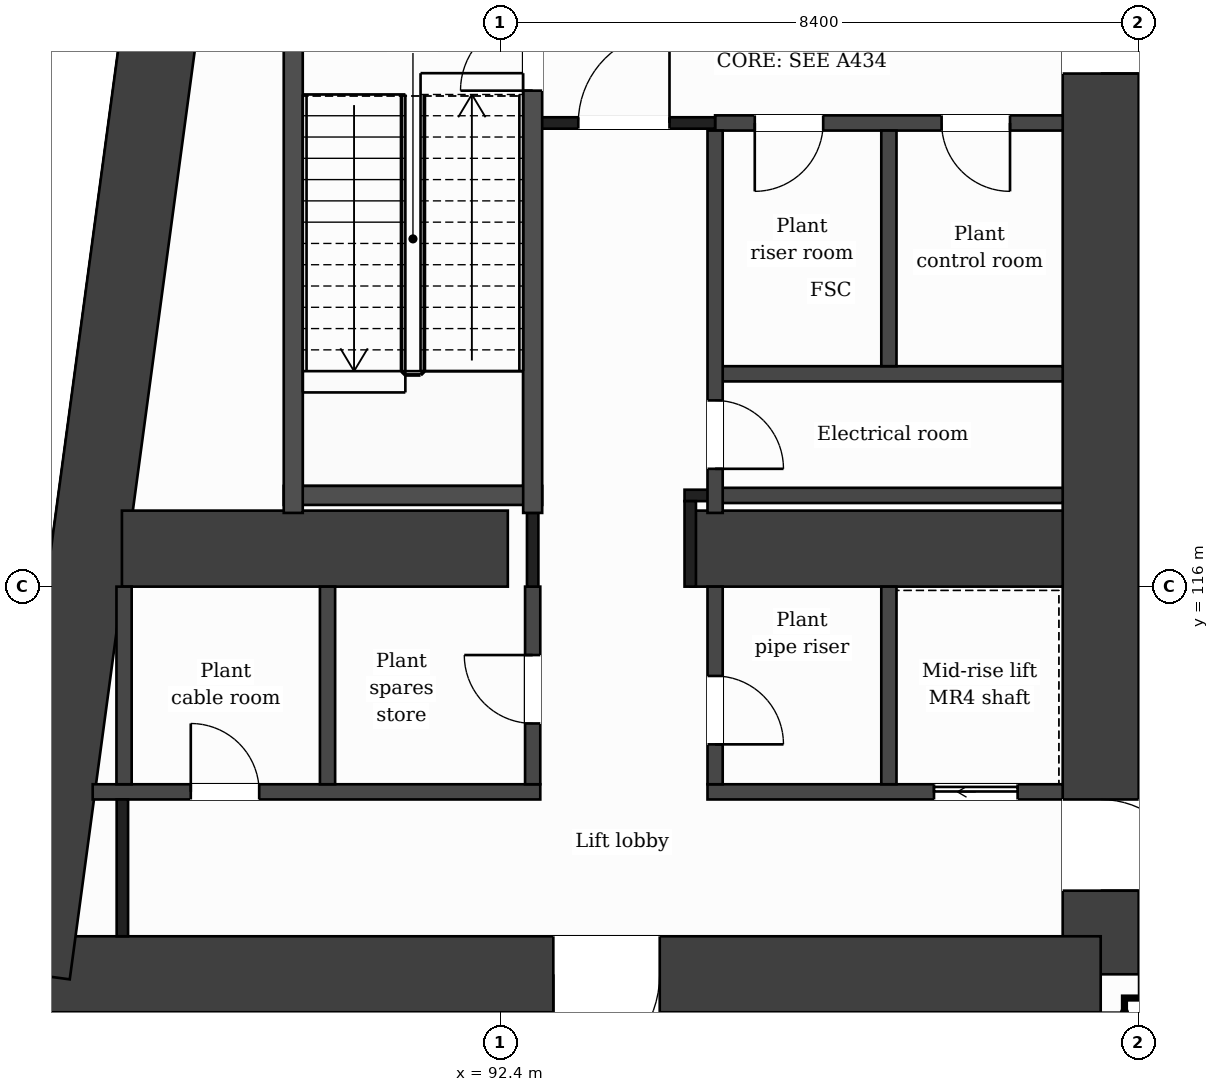
"""IFC4 building model, lengths in metres.
Left out: names, types, materials, properties, quantities, classifications, styles, units other than length and angle.
Written with IfcOpenShell. Run it as: python <this file> out.ifc"""

import sys

from ifc_helpers import new_model, si_unit, direction, frame, frame_2d, origin, place, context, subcontext, project, spatial, rectangle, extrude, element, fill, save


model = new_model("IFC4")
c1 = context("Model", 3, precision=1e-05, world=origin(), true_north=direction((0.0, 1.0)))
c2 = subcontext(c1, "Body", "Model", "MODEL_VIEW")
j1 = project(units=[si_unit("LENGTHUNIT", "METRE"), si_unit("PLANEANGLEUNIT", "RADIAN")], contexts=[c1])
p1 = place(None, origin())
s1 = spatial("IfcSite", under=j1, at=p1, CompositionType="ELEMENT")
p2 = place(p1, origin())
s2 = spatial("IfcBuilding", under=s1, at=p2, CompositionType="ELEMENT")
p3 = place(p2, frame((0.0, 0.0, 142.8)))
s3 = spatial("IfcBuildingStorey", under=s2, at=p3, CompositionType="ELEMENT", Elevation=142.8)
p4 = place(p3, frame((100.3, 131.9, 0.0), z_axis=(0.0, 0.0, 1.0), x_axis=(0.0, -1.0, 0.0)))
e1 = element("IfcWall", 1, at=p4, inside=s3, PredefinedType="SHEAR", context=c2, shape_type="SweptSolid", body=[
    extrude(rectangle(XDim=21.0, YDim=1.0, at=frame_2d((10.5, 0.0))), origin(), (0.0, 0.0, 1.0), 5.0),
])
p5 = place(p4, frame((18.7, 0.0, 0.0)))
e2 = element("IfcOpeningElement", 2, at=p5, cuts=e1, PredefinedType="OPENING", context=c2, shape_type="SweptSolid", body=[
    extrude(rectangle(XDim=1.2, YDim=2.1, at=frame_2d((0.6, 1.05))), frame((0.0, 0.51, 0.0), z_axis=(0.0, -1.0, 0.0), x_axis=(1.0, 0.0, 0.0)), (0.0, 0.0, 1.0), 1.02),
])
p6 = place(p4, frame((7.75, 0.0, 0.0)))
e3 = element("IfcOpeningElement", 3, at=p6, cuts=e1, PredefinedType="OPENING", context=c2, shape_type="SweptSolid", body=[
    extrude(rectangle(XDim=1.4, YDim=2.1, at=frame_2d((0.7, 1.05))), frame((0.0, 0.51, 0.0), z_axis=(0.0, -1.0, 0.0), x_axis=(1.0, 0.0, 0.0)), (0.0, 0.0, 1.0), 1.02),
])
p7 = place(p3, frame((100.3, 110.9, 0.0), z_axis=(0.0, 0.0, 1.0), x_axis=(-1.0, 0.0, 0.0)))
e4 = element("IfcWall", 4, at=p7, inside=s3, PredefinedType="SHEAR", context=c2, shape_type="SweptSolid", body=[
    extrude(rectangle(XDim=14.059, YDim=1.0, at=frame_2d((7.03, 0.0))), origin(), (0.0, 0.0, 1.0), 5.0),
])
p8 = place(p7, frame((5.802, 0.0, 0.0)))
e5 = element("IfcOpeningElement", 5, at=p8, cuts=e4, PredefinedType="OPENING", context=c2, shape_type="SweptSolid", body=[
    extrude(rectangle(XDim=1.4, YDim=2.1, at=frame_2d((0.7, 1.05))), frame((0.0, 0.51, 0.0), z_axis=(0.0, -1.0, 0.0), x_axis=(1.0, 0.0, 0.0)), (0.0, 0.0, 1.0), 1.02),
])
p9 = place(p3, frame((86.241, 110.9, 0.0), z_axis=(0.0, 0.0, 1.0), x_axis=(0.133411141623, 0.991060778808, 0.0)))
e6 = element("IfcWall", 6, at=p9, inside=s3, PredefinedType="SHEAR", context=c2, shape_type="SweptSolid", body=[
    extrude(rectangle(XDim=21.189, YDim=1.0, at=frame_2d((10.595, 0.0))), origin(), (0.0, 0.0, 1.0), 5.0),
])
p10 = place(p3, frame((87.423, 116.5, 0.0), z_axis=(0.0, 0.0, 1.0), x_axis=(1.0, 0.0, 0.0)))
e7 = element("IfcWall", 7, at=p10, inside=s3, PredefinedType="SHEAR", context=c2, shape_type="SweptSolid", body=[
    extrude(rectangle(XDim=5.077, YDim=1.0, at=frame_2d((2.539, 0.0))), origin(), (0.0, 0.0, 1.0), 5.0),
])
p11 = place(p3, frame((94.9, 116.5, 0.0), z_axis=(0.0, 0.0, 1.0), x_axis=(1.0, 0.0, 0.0)))
e8 = element("IfcWall", 8, at=p11, inside=s3, PredefinedType="SHEAR", context=c2, shape_type="SweptSolid", body=[
    extrude(rectangle(XDim=4.9, YDim=1.0, at=frame_2d((2.45, 0.0))), origin(), (0.0, 0.0, 1.0), 5.0),
])
p12 = place(p3, frame((87.334, 110.4, 0.0), z_axis=(0.0, 0.0, 1.0), x_axis=(-0.133437175554, -0.991057273915, 0.0)))
e9 = element("IfcWall", 9, at=p12, inside=s3, PredefinedType="SOLIDWALL", context=c2, shape_type="SweptSolid", body=[
    extrude(rectangle(XDim=6.781, YDim=0.3, at=frame_2d((3.39, 0.0))), origin(), (0.0, 0.0, 1.0), 4.68),
])
p13 = place(p12, frame((1.418, 0.0, 0.0)))
e10 = element("IfcOpeningElement", 10, at=p13, cuts=e9, PredefinedType="OPENING", context=c2, shape_type="SweptSolid", body=[
    extrude(rectangle(XDim=1.2, YDim=2.4, at=frame_2d((0.6, 1.2))), frame((0.0, 0.16, 0.0), z_axis=(0.0, -1.0, 0.0), x_axis=(1.0, 0.0, 0.0)), (0.0, 0.0, 1.0), 0.32),
])
p14 = place(p3, frame((100.7, 110.4, 0.0), z_axis=(0.0, 0.0, 1.0), x_axis=(1.0, 0.0, 0.0)))
e11 = element("IfcWall", 11, at=p14, inside=s3, PredefinedType="PARTITIONING", context=c2, shape_type="SweptSolid", body=[
    extrude(rectangle(XDim=25.4, YDim=0.2, at=frame_2d((12.7, 0.0))), origin(), (0.0, 0.0, 1.0), 4.68),
])
p15 = place(p14, frame((20.5, 0.0, 0.0)))
e12 = element("IfcOpeningElement", 12, at=p15, cuts=e11, PredefinedType="OPENING", context=c2, shape_type="SweptSolid", body=[
    extrude(rectangle(XDim=1.2, YDim=2.1, at=frame_2d((0.6, 1.05))), frame((0.0, 0.11, 0.0), z_axis=(0.0, -1.0, 0.0), x_axis=(1.0, 0.0, 0.0)), (0.0, 0.0, 1.0), 0.22),
])
p16 = place(p3, frame((87.039, 113.3, 0.0), z_axis=(0.0, 0.0, 1.0), x_axis=(1.0, 0.0, 0.0)))
e13 = element("IfcWall", 13, at=p16, inside=s3, PredefinedType="PARTITIONING", context=c2, shape_type="SweptSolid", body=[
    extrude(rectangle(XDim=5.888, YDim=0.2, at=frame_2d((2.944, 0.0))), origin(), (0.0, 0.0, 1.0), 4.68),
])
p17 = place(p16, frame((1.29, 0.0, 0.0)))
e14 = element("IfcOpeningElement", 14, at=p17, cuts=e13, PredefinedType="OPENING", context=c2, shape_type="SweptSolid", body=[
    extrude(rectangle(XDim=0.9, YDim=2.1, at=frame_2d((0.45, 1.05))), frame((0.0, 0.11, 0.0), z_axis=(0.0, -1.0, 0.0), x_axis=(1.0, 0.0, 0.0)), (0.0, 0.0, 1.0), 0.22),
])
p18 = place(p3, frame((95.127, 113.3, 0.0), z_axis=(0.0, 0.0, 1.0), x_axis=(1.0, 0.0, 0.0)))
e15 = element("IfcWall", 15, at=p18, inside=s3, PredefinedType="PARTITIONING", context=c2, shape_type="SweptSolid", body=[
    extrude(rectangle(XDim=4.673, YDim=0.2, at=frame_2d((2.336, 0.0))), origin(), (0.0, 0.0, 1.0), 4.68),
])
p19 = place(p18, frame((2.98, 0.0, 0.0)))
e16 = element("IfcOpeningElement", 16, at=p19, cuts=e15, PredefinedType="OPENING", context=c2, shape_type="SweptSolid", body=[
    extrude(rectangle(XDim=1.1, YDim=2.1, at=frame_2d((0.55, 1.05))), frame((0.0, 0.11, 0.0), z_axis=(0.0, -1.0, 0.0), x_axis=(1.0, 0.0, 0.0)), (0.0, 0.0, 1.0), 0.22),
])
p20 = place(p3, frame((95.227, 117.2, 0.0), z_axis=(0.0, 0.0, 1.0), x_axis=(1.0, 0.0, 0.0)))
e17 = element("IfcWall", 17, at=p20, inside=s3, PredefinedType="PARTITIONING", context=c2, shape_type="SweptSolid", body=[
    extrude(rectangle(XDim=4.573, YDim=0.2, at=frame_2d((2.287, 0.0))), origin(), (0.0, 0.0, 1.0), 4.68),
])
p21 = place(p3, frame((94.825, 117.2, 0.0), z_axis=(0.0, 0.0, 1.0), x_axis=(1.0, 0.0, 0.0)))
e18 = element("IfcWall", 18, at=p21, inside=s3, PredefinedType="PARTITIONING", context=c2, shape_type="SweptSolid", body=[
    extrude(rectangle(XDim=0.402, YDim=0.15, at=frame_2d((0.201, 0.0))), origin(), (0.0, 0.0, 1.0), 4.68),
])
p22 = place(p3, frame((89.552, 117.2, 0.0), z_axis=(0.0, 0.0, 1.0), x_axis=(1.0, 0.0, 0.0)))
e19 = element("IfcWall", 19, at=p22, inside=s3, PredefinedType="PARTITIONING", context=c2, shape_type="SweptSolid", body=[
    extrude(rectangle(XDim=3.4, YDim=0.25, at=frame_2d((1.7, 0.0))), origin(), (0.0, 0.0, 1.0), 4.68),
])
p23 = place(p3, frame((95.227, 118.8, 0.0), z_axis=(0.0, 0.0, 1.0), x_axis=(1.0, 0.0, 0.0)))
e20 = element("IfcWall", 20, at=p23, inside=s3, PredefinedType="PARTITIONING", context=c2, shape_type="SweptSolid", body=[
    extrude(rectangle(XDim=4.573, YDim=0.2, at=frame_2d((2.287, 0.0))), origin(), (0.0, 0.0, 1.0), 4.68),
])
p24 = place(p3, frame((95.227, 122.1, 0.0), z_axis=(0.0, 0.0, 1.0), x_axis=(1.0, 0.0, 0.0)))
e21 = element("IfcWall", 21, at=p24, inside=s3, PredefinedType="PARTITIONING", context=c2, shape_type="SweptSolid", body=[
    extrude(rectangle(XDim=4.573, YDim=0.2, at=frame_2d((2.287, 0.0))), origin(), (0.0, 0.0, 1.0), 4.68),
])
p25 = place(p24, frame((0.522, 0.0, 0.0)))
e22 = element("IfcOpeningElement", 22, at=p25, cuts=e21, PredefinedType="OPENING", context=c2, shape_type="SweptSolid", body=[
    extrude(rectangle(XDim=0.9, YDim=2.1, at=frame_2d((0.45, 1.05))), frame((0.0, 0.11, 0.0), z_axis=(0.0, -1.0, 0.0), x_axis=(1.0, 0.0, 0.0)), (0.0, 0.0, 1.0), 0.22),
])
p26 = place(p24, frame((2.98, 0.0, 0.0)))
e23 = element("IfcOpeningElement", 23, at=p26, cuts=e21, PredefinedType="OPENING", context=c2, shape_type="SweptSolid", body=[
    extrude(rectangle(XDim=0.9, YDim=2.1, at=frame_2d((0.45, 1.05))), frame((0.0, 0.11, 0.0), z_axis=(0.0, -1.0, 0.0), x_axis=(1.0, 0.0, 0.0)), (0.0, 0.0, 1.0), 0.22),
])
p27 = place(p3, frame((92.827, 122.1, 0.0), z_axis=(0.0, 0.0, 1.0), x_axis=(1.0, 0.0, 0.0)))
e24 = element("IfcWall", 24, at=p27, inside=s3, PredefinedType="PARTITIONING", context=c2, shape_type="SweptSolid", body=[
    extrude(rectangle(XDim=2.4, YDim=0.15, at=frame_2d((1.2, 0.0))), origin(), (0.0, 0.0, 1.0), 4.68),
])
p28 = place(p27, frame((0.6, 0.0, 0.0)))
e25 = element("IfcOpeningElement", 25, at=p28, cuts=e24, PredefinedType="OPENING", context=c2, shape_type="SweptSolid", body=[
    extrude(rectangle(XDim=1.2, YDim=2.1, at=frame_2d((0.6, 1.05))), frame((0.0, 0.085, 0.0), z_axis=(0.0, -1.0, 0.0), x_axis=(1.0, 0.0, 0.0)), (0.0, 0.0, 1.0), 0.17),
])
p29 = place(p3, frame((87.451, 113.4, 0.0), z_axis=(0.0, 0.0, 1.0), x_axis=(0.0, 1.0, 0.0)))
e26 = element("IfcWall", 26, at=p29, inside=s3, PredefinedType="PARTITIONING", context=c2, shape_type="SweptSolid", body=[
    extrude(rectangle(XDim=2.6, YDim=0.2, at=frame_2d((1.3, 0.0))), origin(), (0.0, 0.0, 1.0), 4.68),
])
p30 = place(p3, frame((87.429, 111.4, 0.0), z_axis=(0.0, 0.0, 1.0), x_axis=(0.0, 1.0, 0.0)))
e27 = element("IfcWall", 27, at=p30, inside=s3, PredefinedType="PARTITIONING", context=c2, shape_type="SweptSolid", body=[
    extrude(rectangle(XDim=1.8, YDim=0.15, at=frame_2d((0.9, 0.0))), origin(), (0.0, 0.0, 1.0), 4.68),
])
p31 = place(p3, frame((89.677, 116.97, 0.0), z_axis=(0.0, 0.0, 1.0), x_axis=(0.0, 1.0, 0.0)))
e28 = element("IfcWall", 28, at=p31, inside=s3, PredefinedType="PARTITIONING", context=c2, shape_type="SweptSolid", body=[
    extrude(rectangle(XDim=6.855, YDim=0.25, at=frame_2d((3.427, 0.0))), origin(), (0.0, 0.0, 1.0), 4.68),
])
p32 = place(p3, frame((90.128, 113.4, 0.0), z_axis=(0.0, 0.0, 1.0), x_axis=(0.0, 1.0, 0.0)))
e29 = element("IfcWall", 29, at=p32, inside=s3, PredefinedType="PARTITIONING", context=c2, shape_type="SweptSolid", body=[
    extrude(rectangle(XDim=2.6, YDim=0.2, at=frame_2d((1.3, 0.0))), origin(), (0.0, 0.0, 1.0), 4.68),
])
p33 = place(p3, frame((92.827, 113.4, 0.0), z_axis=(0.0, 0.0, 1.0), x_axis=(0.0, 1.0, 0.0)))
e30 = element("IfcWall", 30, at=p33, inside=s3, PredefinedType="PARTITIONING", context=c2, shape_type="SweptSolid", body=[
    extrude(rectangle(XDim=2.6, YDim=0.2, at=frame_2d((1.3, 0.0))), origin(), (0.0, 0.0, 1.0), 4.68),
])
p34 = place(p33, frame((0.8, 0.0, 0.0)))
e31 = element("IfcOpeningElement", 31, at=p34, cuts=e30, PredefinedType="OPENING", context=c2, shape_type="SweptSolid", body=[
    extrude(rectangle(XDim=0.9, YDim=2.1, at=frame_2d((0.45, 1.05))), frame((0.0, 0.11, 0.0), z_axis=(0.0, -1.0, 0.0), x_axis=(1.0, 0.0, 0.0)), (0.0, 0.0, 1.0), 0.22),
])
p35 = place(p3, frame((92.827, 116.0, 0.0), z_axis=(0.0, 0.0, 1.0), x_axis=(0.0, 1.0, 0.0)))
e32 = element("IfcWall", 32, at=p35, inside=s3, PredefinedType="PARTITIONING", context=c2, shape_type="SweptSolid", body=[
    extrude(rectangle(XDim=0.97, YDim=0.15, at=frame_2d((0.485, 0.0))), origin(), (0.0, 0.0, 1.0), 4.68),
])
p36 = place(p3, frame((92.827, 116.97, 0.0), z_axis=(0.0, 0.0, 1.0), x_axis=(0.0, 1.0, 0.0)))
e33 = element("IfcWall", 33, at=p36, inside=s3, PredefinedType="PARTITIONING", context=c2, shape_type="SweptSolid", body=[
    extrude(rectangle(XDim=6.855, YDim=0.25, at=frame_2d((3.427, 0.0))), origin(), (0.0, 0.0, 1.0), 4.68),
])
p37 = place(p36, frame((5.555, 0.0, 0.0)))
e34 = element("IfcOpeningElement", 34, at=p37, cuts=e33, PredefinedType="OPENING", context=c2, shape_type="SweptSolid", body=[
    extrude(rectangle(XDim=0.95, YDim=2.1, at=frame_2d((0.475, 1.05))), frame((0.0, 0.135, 0.0), z_axis=(0.0, -1.0, 0.0), x_axis=(1.0, 0.0, 0.0)), (0.0, 0.0, 1.0), 0.27),
])
p38 = place(p3, frame((94.9, 116.0, 0.0), z_axis=(0.0, 0.0, 1.0), x_axis=(0.0, 1.0, 0.0)))
e35 = element("IfcWall", 35, at=p38, inside=s3, PredefinedType="PARTITIONING", context=c2, shape_type="SweptSolid", body=[
    extrude(rectangle(XDim=1.125, YDim=0.15, at=frame_2d((0.562, 0.0))), origin(), (0.0, 0.0, 1.0), 4.68),
])
p39 = place(p3, frame((95.227, 113.4, 0.0), z_axis=(0.0, 0.0, 1.0), x_axis=(0.0, 1.0, 0.0)))
e36 = element("IfcWall", 36, at=p39, inside=s3, PredefinedType="PARTITIONING", context=c2, shape_type="SweptSolid", body=[
    extrude(rectangle(XDim=2.6, YDim=0.2, at=frame_2d((1.3, 0.0))), origin(), (0.0, 0.0, 1.0), 4.68),
])
p40 = place(p39, frame((0.525, 0.0, 0.0)))
e37 = element("IfcOpeningElement", 37, at=p40, cuts=e36, PredefinedType="OPENING", context=c2, shape_type="SweptSolid", body=[
    extrude(rectangle(XDim=0.9, YDim=2.1, at=frame_2d((0.45, 1.05))), frame((0.0, 0.11, 0.0), z_axis=(0.0, -1.0, 0.0), x_axis=(1.0, 0.0, 0.0)), (0.0, 0.0, 1.0), 0.22),
])
p41 = place(p3, frame((95.227, 116.97, 0.0), z_axis=(0.0, 0.0, 1.0), x_axis=(0.0, 1.0, 0.0)))
e38 = element("IfcWall", 38, at=p41, inside=s3, PredefinedType="PARTITIONING", context=c2, shape_type="SweptSolid", body=[
    extrude(rectangle(XDim=5.03, YDim=0.2, at=frame_2d((2.515, 0.0))), origin(), (0.0, 0.0, 1.0), 4.68),
])
p42 = place(p41, frame((0.58, 0.0, 0.0)))
e39 = element("IfcOpeningElement", 39, at=p42, cuts=e38, PredefinedType="OPENING", context=c2, shape_type="SweptSolid", body=[
    extrude(rectangle(XDim=0.9, YDim=2.1, at=frame_2d((0.45, 1.05))), frame((0.0, 0.11, 0.0), z_axis=(0.0, -1.0, 0.0), x_axis=(1.0, 0.0, 0.0)), (0.0, 0.0, 1.0), 0.22),
])
p43 = place(p3, frame((97.513, 113.4, 0.0), z_axis=(0.0, 0.0, 1.0), x_axis=(0.0, 1.0, 0.0)))
e40 = element("IfcWall", 40, at=p43, inside=s3, PredefinedType="PARTITIONING", context=c2, shape_type="SweptSolid", body=[
    extrude(rectangle(XDim=2.6, YDim=0.2, at=frame_2d((1.3, 0.0))), origin(), (0.0, 0.0, 1.0), 4.68),
])
p44 = place(p3, frame((97.513, 118.9, 0.0), z_axis=(0.0, 0.0, 1.0), x_axis=(0.0, 1.0, 0.0)))
e41 = element("IfcWall", 41, at=p44, inside=s3, PredefinedType="PARTITIONING", context=c2, shape_type="SweptSolid", body=[
    extrude(rectangle(XDim=3.1, YDim=0.2, at=frame_2d((1.55, 0.0))), origin(), (0.0, 0.0, 1.0), 4.68),
])
p45 = place(p28, origin())
e42 = element("IfcDoor", 42, at=p45, inside=s3, OperationType="SINGLE_SWING_RIGHT", PredefinedType="DOOR", context=c2, shape_type="SweptSolid", body=[
    extrude(rectangle(XDim=1.2, YDim=2.1, at=frame_2d((0.6, 1.05))), frame((0.0, 0.025, 0.0), z_axis=(0.0, -1.0, 0.0), x_axis=(1.0, 0.0, 0.0)), (0.0, 0.0, 1.0), 0.05),
])
fill(e25, e42)
p46 = place(p25, origin())
e43 = element("IfcDoor", 43, at=p46, inside=s3, OperationType="SINGLE_SWING_LEFT", PredefinedType="DOOR", context=c2, shape_type="SweptSolid", body=[
    extrude(rectangle(XDim=0.9, YDim=2.1, at=frame_2d((0.45, 1.05))), frame((0.0, 0.025, 0.0), z_axis=(0.0, -1.0, 0.0), x_axis=(1.0, 0.0, 0.0)), (0.0, 0.0, 1.0), 0.05),
])
fill(e22, e43)
p47 = place(p26, origin())
e44 = element("IfcDoor", 44, at=p47, inside=s3, OperationType="SINGLE_SWING_RIGHT", PredefinedType="DOOR", context=c2, shape_type="SweptSolid", body=[
    extrude(rectangle(XDim=0.9, YDim=2.1, at=frame_2d((0.45, 1.05))), frame((0.0, 0.025, 0.0), z_axis=(0.0, -1.0, 0.0), x_axis=(1.0, 0.0, 0.0)), (0.0, 0.0, 1.0), 0.05),
])
fill(e23, e44)
p48 = place(p37, origin())
e45 = element("IfcDoor", 45, at=p48, inside=s3, OperationType="SINGLE_SWING_LEFT", PredefinedType="DOOR", context=c2, shape_type="SweptSolid", body=[
    extrude(rectangle(XDim=0.95, YDim=2.1, at=frame_2d((0.475, 1.05))), frame((0.0, 0.025, 0.0), z_axis=(0.0, -1.0, 0.0), x_axis=(1.0, 0.0, 0.0)), (0.0, 0.0, 1.0), 0.05),
])
fill(e34, e45)
p49 = place(p42, origin())
e46 = element("IfcDoor", 46, at=p49, inside=s3, OperationType="SINGLE_SWING_LEFT", PredefinedType="DOOR", context=c2, shape_type="SweptSolid", body=[
    extrude(rectangle(XDim=0.9, YDim=2.1, at=frame_2d((0.45, 1.05))), frame((0.0, 0.025, 0.0), z_axis=(0.0, -1.0, 0.0), x_axis=(1.0, 0.0, 0.0)), (0.0, 0.0, 1.0), 0.05),
])
fill(e39, e46)
p50 = place(p19, origin())
e47 = element("IfcDoor", 47, at=p50, inside=s3, OperationType="SLIDING_TO_LEFT", PredefinedType="DOOR", context=c2, shape_type="SweptSolid", body=[
    extrude(rectangle(XDim=1.1, YDim=2.1, at=frame_2d((0.55, 1.05))), frame((0.0, 0.025, 0.0), z_axis=(0.0, -1.0, 0.0), x_axis=(1.0, 0.0, 0.0)), (0.0, 0.0, 1.0), 0.05),
])
fill(e16, e47)
p51 = place(p17, origin())
e48 = element("IfcDoor", 48, at=p51, inside=s3, OperationType="SINGLE_SWING_LEFT", PredefinedType="DOOR", context=c2, shape_type="SweptSolid", body=[
    extrude(rectangle(XDim=0.9, YDim=2.1, at=frame_2d((0.45, 1.05))), frame((0.0, 0.025, 0.0), z_axis=(0.0, -1.0, 0.0), x_axis=(1.0, 0.0, 0.0)), (0.0, 0.0, 1.0), 0.05),
])
fill(e14, e48)
p52 = place(p34, origin())
e49 = element("IfcDoor", 49, at=p52, inside=s3, OperationType="SINGLE_SWING_RIGHT", PredefinedType="DOOR", context=c2, shape_type="SweptSolid", body=[
    extrude(rectangle(XDim=0.9, YDim=2.1, at=frame_2d((0.45, 1.05))), frame((0.0, 0.025, 0.0), z_axis=(0.0, -1.0, 0.0), x_axis=(1.0, 0.0, 0.0)), (0.0, 0.0, 1.0), 0.05),
])
fill(e31, e49)
p53 = place(p40, origin())
e50 = element("IfcDoor", 50, at=p53, inside=s3, OperationType="SINGLE_SWING_LEFT", PredefinedType="DOOR", context=c2, shape_type="SweptSolid", body=[
    extrude(rectangle(XDim=0.9, YDim=2.1, at=frame_2d((0.45, 1.05))), frame((0.0, 0.025, 0.0), z_axis=(0.0, -1.0, 0.0), x_axis=(1.0, 0.0, 0.0)), (0.0, 0.0, 1.0), 0.05),
])
fill(e37, e50)
p54 = place(p8, origin())
e51 = element("IfcDoor", 51, at=p54, inside=s3, OperationType="SINGLE_SWING_RIGHT", PredefinedType="DOOR", context=c2, shape_type="SweptSolid", body=[
    extrude(rectangle(XDim=1.4, YDim=2.1, at=frame_2d((0.7, 1.05))), frame((0.0, 0.025, 0.0), z_axis=(0.0, -1.0, 0.0), x_axis=(1.0, 0.0, 0.0)), (0.0, 0.0, 1.0), 0.05),
])
fill(e5, e51)
p55 = place(p5, origin())
e52 = element("IfcDoor", 52, at=p55, inside=s3, OperationType="SINGLE_SWING_RIGHT", PredefinedType="DOOR", context=c2, shape_type="SweptSolid", body=[
    extrude(rectangle(XDim=1.2, YDim=2.1, at=frame_2d((0.6, 1.05))), frame((0.0, 0.025, 0.0), z_axis=(0.0, -1.0, 0.0), x_axis=(1.0, 0.0, 0.0)), (0.0, 0.0, 1.0), 0.05),
])
fill(e2, e52)
p56 = place(p6, origin())
e53 = element("IfcDoor", 53, at=p56, inside=s3, OperationType="SINGLE_SWING_RIGHT", PredefinedType="DOOR", context=c2, shape_type="SweptSolid", body=[
    extrude(rectangle(XDim=1.4, YDim=2.1, at=frame_2d((0.7, 1.05))), frame((0.0, 0.025, 0.0), z_axis=(0.0, -1.0, 0.0), x_axis=(1.0, 0.0, 0.0)), (0.0, 0.0, 1.0), 0.05),
])
fill(e3, e53)
save(model, sys.argv[1])
